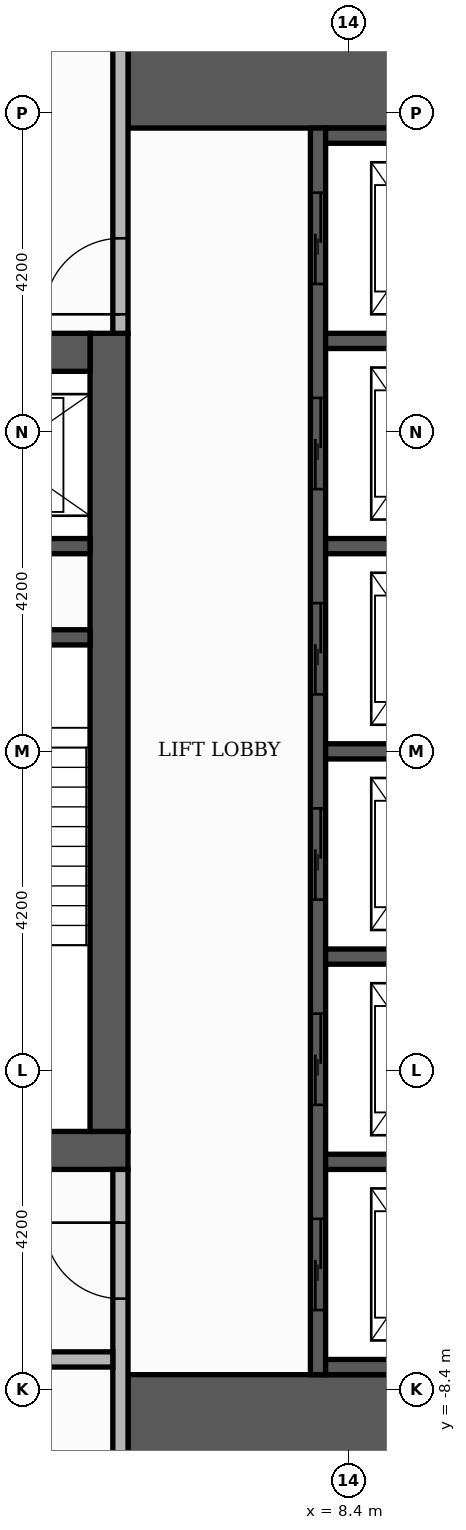
"""IFC4 building model, lengths in metres.
Left out: names, types, materials, properties, quantities, classifications, styles, units other than length and angle.
Written with IfcOpenShell. Run it as: python <this file> out.ifc"""

import sys

from ifc_helpers import new_model, si_unit, direction, frame, frame_2d, origin, place, context, subcontext, project, spatial, rectangle, extrude, element, fill, save


model = new_model("IFC4")
c1 = context("Model", 3, precision=1e-05, world=origin(), true_north=direction((0.0, 1.0)))
c2 = subcontext(c1, "Body", "Model", "MODEL_VIEW")
j1 = project(units=[si_unit("LENGTHUNIT", "METRE"), si_unit("PLANEANGLEUNIT", "RADIAN")], contexts=[c1])
p1 = place(None, origin())
s1 = spatial("IfcSite", under=j1, at=p1, CompositionType="ELEMENT")
p2 = place(p1, origin())
s2 = spatial("IfcBuilding", under=s1, at=p2, CompositionType="ELEMENT")
p3 = place(p2, frame((0.0, 0.0, 240.6)))
s3 = spatial("IfcBuildingStorey", under=s2, at=p3, CompositionType="ELEMENT", Elevation=240.6)
p4 = place(p3, frame((-5.5, -5.25, 0.0), z_axis=(0.0, 0.0, 1.0), x_axis=(1.0, 0.0, 0.0)))
e1 = element("IfcWall", 1, at=p4, inside=s3, PredefinedType="SHEAR", context=c2, shape_type="SweptSolid", body=[
    extrude(rectangle(XDim=11.0, YDim=0.5, at=frame_2d((5.5, 0.0))), origin(), (0.0, 0.0, 1.0), 3.48),
])
p5 = place(p4, frame((4.9, 0.0, 0.0)))
e2 = element("IfcOpeningElement", 2, at=p5, cuts=e1, PredefinedType="OPENING", context=c2, shape_type="SweptSolid", body=[
    extrude(rectangle(XDim=1.2, YDim=2.1, at=frame_2d((0.6, 1.05))), frame((0.0, 0.26, 0.0), z_axis=(0.0, -1.0, 0.0), x_axis=(1.0, 0.0, 0.0)), (0.0, 0.0, 1.0), 0.52),
])
p6 = place(p3, frame((5.25, -5.0, 0.0), z_axis=(0.0, 0.0, 1.0), x_axis=(0.0, 1.0, 0.0)))
e3 = element("IfcWall", 3, at=p6, inside=s3, PredefinedType="SHEAR", context=c2, shape_type="SweptSolid", body=[
    extrude(rectangle(XDim=10.5, YDim=0.5, at=frame_2d((5.25, 0.0))), origin(), (0.0, 0.0, 1.0), 3.48),
])
p7 = place(p3, frame((-5.0, 5.25, 0.0), z_axis=(0.0, 0.0, 1.0), x_axis=(1.0, 0.0, 0.0)))
e4 = element("IfcWall", 4, at=p7, inside=s3, PredefinedType="SHEAR", context=c2, shape_type="SweptSolid", body=[
    extrude(rectangle(XDim=10.0, YDim=0.5, at=frame_2d((5.0, 0.0))), origin(), (0.0, 0.0, 1.0), 3.48),
])
p8 = place(p7, frame((4.4, 0.0, 0.0)))
e5 = element("IfcOpeningElement", 5, at=p8, cuts=e4, PredefinedType="OPENING", context=c2, shape_type="SweptSolid", body=[
    extrude(rectangle(XDim=1.2, YDim=2.1, at=frame_2d((0.6, 1.05))), frame((0.0, 0.26, 0.0), z_axis=(0.0, -1.0, 0.0), x_axis=(1.0, 0.0, 0.0)), (0.0, 0.0, 1.0), 0.52),
])
for number, where, z_axis, x_axis in (
    (6, (5.5, -9.15, 0.0), (0.0, 0.0, 1.0), (1.0, 0.0, 0.0)),
    (7, (5.5, 9.15, 0.0), (0.0, 0.0, 1.0), (1.0, 0.0, 0.0)),
):
    element("IfcWall", number, at=place(p3, frame(where, z_axis=z_axis, x_axis=x_axis)), inside=s3, PredefinedType="SHEAR", context=c2, shape_type="SweptSolid", body=[
        extrude(rectangle(XDim=4.6, YDim=1.9, at=frame_2d((2.3, 0.0))), origin(), (0.0, 0.0, 1.0), 3.48),
    ])
p9 = place(p3, frame((2.15, 1.5, 0.0), z_axis=(0.0, 0.0, 1.0), x_axis=(1.0, 0.0, 0.0)))
e8 = element("IfcWall", 8, at=p9, inside=s3, PredefinedType="SHEAR", context=c2, shape_type="SweptSolid", body=[
    extrude(rectangle(XDim=2.85, YDim=0.2, at=frame_2d((1.425, 0.0))), origin(), (0.0, 0.0, 1.0), 3.48),
])
p10 = place(p3, frame((8.0, -8.2, 0.0), z_axis=(0.0, 0.0, 1.0), x_axis=(0.0, 1.0, 0.0)))
e9 = element("IfcWall", 9, at=p10, inside=s3, PredefinedType="SHEAR", context=c2, shape_type="SweptSolid", body=[
    extrude(rectangle(XDim=16.4, YDim=0.2, at=frame_2d((8.2, 0.0))), origin(), (0.0, 0.0, 1.0), 3.48),
])
p11 = place(p10, frame((0.85, 0.0, 0.0)))
e10 = element("IfcOpeningElement", 10, at=p11, cuts=e9, PredefinedType="OPENING", context=c2, shape_type="SweptSolid", body=[
    extrude(rectangle(XDim=1.2, YDim=2.1, at=frame_2d((0.6, 1.05))), frame((0.0, 0.11, 0.0), z_axis=(0.0, -1.0, 0.0), x_axis=(1.0, 0.0, 0.0)), (0.0, 0.0, 1.0), 0.22),
])
p12 = place(p10, frame((3.55, 0.0, 0.0)))
e11 = element("IfcOpeningElement", 11, at=p12, cuts=e9, PredefinedType="OPENING", context=c2, shape_type="SweptSolid", body=[
    extrude(rectangle(XDim=1.2, YDim=2.1, at=frame_2d((0.6, 1.05))), frame((0.0, 0.11, 0.0), z_axis=(0.0, -1.0, 0.0), x_axis=(1.0, 0.0, 0.0)), (0.0, 0.0, 1.0), 0.22),
])
p13 = place(p10, frame((6.25, 0.0, 0.0)))
e12 = element("IfcOpeningElement", 12, at=p13, cuts=e9, PredefinedType="OPENING", context=c2, shape_type="SweptSolid", body=[
    extrude(rectangle(XDim=1.2, YDim=2.1, at=frame_2d((0.6, 1.05))), frame((0.0, 0.11, 0.0), z_axis=(0.0, -1.0, 0.0), x_axis=(1.0, 0.0, 0.0)), (0.0, 0.0, 1.0), 0.22),
])
p14 = place(p10, frame((8.95, 0.0, 0.0)))
e13 = element("IfcOpeningElement", 13, at=p14, cuts=e9, PredefinedType="OPENING", context=c2, shape_type="SweptSolid", body=[
    extrude(rectangle(XDim=1.2, YDim=2.1, at=frame_2d((0.6, 1.05))), frame((0.0, 0.11, 0.0), z_axis=(0.0, -1.0, 0.0), x_axis=(1.0, 0.0, 0.0)), (0.0, 0.0, 1.0), 0.22),
])
p15 = place(p10, frame((11.65, 0.0, 0.0)))
e14 = element("IfcOpeningElement", 14, at=p15, cuts=e9, PredefinedType="OPENING", context=c2, shape_type="SweptSolid", body=[
    extrude(rectangle(XDim=1.2, YDim=2.1, at=frame_2d((0.6, 1.05))), frame((0.0, 0.11, 0.0), z_axis=(0.0, -1.0, 0.0), x_axis=(1.0, 0.0, 0.0)), (0.0, 0.0, 1.0), 0.22),
])
p16 = place(p10, frame((14.35, 0.0, 0.0)))
e15 = element("IfcOpeningElement", 15, at=p16, cuts=e9, PredefinedType="OPENING", context=c2, shape_type="SweptSolid", body=[
    extrude(rectangle(XDim=1.2, YDim=2.1, at=frame_2d((0.6, 1.05))), frame((0.0, 0.11, 0.0), z_axis=(0.0, -1.0, 0.0), x_axis=(1.0, 0.0, 0.0)), (0.0, 0.0, 1.0), 0.22),
])
for number, where, z_axis, x_axis in (
    (16, (8.1, -8.1, 0.0), (0.0, 0.0, 1.0), (1.0, 0.0, 0.0)),
    (17, (8.1, -5.4, 0.0), (0.0, 0.0, 1.0), (1.0, 0.0, 0.0)),
    (18, (8.1, -2.7, 0.0), (0.0, 0.0, 1.0), (1.0, 0.0, 0.0)),
    (19, (8.1, 0.0, 0.0), (0.0, 0.0, 1.0), (1.0, 0.0, 0.0)),
):
    element("IfcWall", number, at=place(p3, frame(where, z_axis=z_axis, x_axis=x_axis)), inside=s3, PredefinedType="SHEAR", context=c2, shape_type="SweptSolid", body=[
        extrude(rectangle(XDim=2.0, YDim=0.2, at=frame_2d((1.0, 0.0))), origin(), (0.0, 0.0, 1.0), 3.48),
    ])
p17 = place(p3, frame((2.15, 2.7, 0.0), z_axis=(0.0, 0.0, 1.0), x_axis=(1.0, 0.0, 0.0)))
e20 = element("IfcWall", 20, at=p17, inside=s3, PredefinedType="SHEAR", context=c2, shape_type="SweptSolid", body=[
    extrude(rectangle(XDim=2.85, YDim=0.2, at=frame_2d((1.425, 0.0))), origin(), (0.0, 0.0, 1.0), 3.48),
])
for number, where, z_axis, x_axis in (
    (21, (8.1, 2.7, 0.0), (0.0, 0.0, 1.0), (1.0, 0.0, 0.0)),
    (22, (8.1, 5.4, 0.0), (0.0, 0.0, 1.0), (1.0, 0.0, 0.0)),
    (23, (8.1, 8.1, 0.0), (0.0, 0.0, 1.0), (1.0, 0.0, 0.0)),
):
    element("IfcWall", number, at=place(p3, frame(where, z_axis=z_axis, x_axis=x_axis)), inside=s3, PredefinedType="SHEAR", context=c2, shape_type="SweptSolid", body=[
        extrude(rectangle(XDim=2.0, YDim=0.2, at=frame_2d((1.0, 0.0))), origin(), (0.0, 0.0, 1.0), 3.48),
    ])
p18 = place(p3, frame((5.4, -10.1, 0.0), z_axis=(0.0, 0.0, 1.0), x_axis=(0.0, 1.0, 0.0)))
e24 = element("IfcWall", 24, at=p18, inside=s3, PredefinedType="PARTITIONING", context=c2, shape_type="SweptSolid", body=[
    extrude(rectangle(XDim=4.6, YDim=0.2, at=frame_2d((2.3, 0.0))), origin(), (0.0, 0.0, 1.0), 3.48),
])
p19 = place(p18, frame((2.9, 0.0, 0.0)))
e25 = element("IfcOpeningElement", 25, at=p19, cuts=e24, PredefinedType="OPENING", context=c2, shape_type="SweptSolid", body=[
    extrude(rectangle(XDim=1.0, YDim=2.1, at=frame_2d((0.5, 1.05))), frame((0.0, 0.11, 0.0), z_axis=(0.0, -1.0, 0.0), x_axis=(1.0, 0.0, 0.0)), (0.0, 0.0, 1.0), 0.22),
])
p20 = place(p3, frame((2.35, -8.0, 0.0), z_axis=(0.0, 0.0, 1.0), x_axis=(1.0, 0.0, 0.0)))
e26 = element("IfcWall", 26, at=p20, inside=s3, PredefinedType="PARTITIONING", context=c2, shape_type="SweptSolid", body=[
    extrude(rectangle(XDim=2.95, YDim=0.2, at=frame_2d((1.475, 0.0))), origin(), (0.0, 0.0, 1.0), 3.48),
])
p21 = place(p20, frame((1.0, 0.0, 0.0)))
e27 = element("IfcOpeningElement", 27, at=p21, cuts=e26, PredefinedType="OPENING", context=c2, shape_type="SweptSolid", body=[
    extrude(rectangle(XDim=0.9, YDim=2.1, at=frame_2d((0.45, 1.05))), frame((0.0, 0.11, 0.0), z_axis=(0.0, -1.0, 0.0), x_axis=(1.0, 0.0, 0.0)), (0.0, 0.0, 1.0), 0.22),
])
p22 = place(p3, frame((5.4, 5.5, 0.0), z_axis=(0.0, 0.0, 1.0), x_axis=(0.0, 1.0, 0.0)))
e28 = element("IfcWall", 28, at=p22, inside=s3, PredefinedType="PARTITIONING", context=c2, shape_type="SweptSolid", body=[
    extrude(rectangle(XDim=4.6, YDim=0.2, at=frame_2d((2.3, 0.0))), origin(), (0.0, 0.0, 1.0), 3.48),
])
p23 = place(p22, frame((0.25, 0.0, 0.0)))
e29 = element("IfcOpeningElement", 29, at=p23, cuts=e28, PredefinedType="OPENING", context=c2, shape_type="SweptSolid", body=[
    extrude(rectangle(XDim=1.0, YDim=2.1, at=frame_2d((0.5, 1.05))), frame((0.0, 0.11, 0.0), z_axis=(0.0, -1.0, 0.0), x_axis=(1.0, 0.0, 0.0)), (0.0, 0.0, 1.0), 0.22),
])
p24 = place(p11, origin())
e30 = element("IfcDoor", 30, at=p24, inside=s3, OperationType="SLIDING_TO_LEFT", PredefinedType="DOOR", context=c2, shape_type="SweptSolid", body=[
    extrude(rectangle(XDim=1.2, YDim=2.1, at=frame_2d((0.6, 1.05))), frame((0.0, 0.025, 0.0), z_axis=(0.0, -1.0, 0.0), x_axis=(1.0, 0.0, 0.0)), (0.0, 0.0, 1.0), 0.05),
])
fill(e10, e30)
p25 = place(p12, origin())
e31 = element("IfcDoor", 31, at=p25, inside=s3, OperationType="SLIDING_TO_LEFT", PredefinedType="DOOR", context=c2, shape_type="SweptSolid", body=[
    extrude(rectangle(XDim=1.2, YDim=2.1, at=frame_2d((0.6, 1.05))), frame((0.0, 0.025, 0.0), z_axis=(0.0, -1.0, 0.0), x_axis=(1.0, 0.0, 0.0)), (0.0, 0.0, 1.0), 0.05),
])
fill(e11, e31)
p26 = place(p13, origin())
e32 = element("IfcDoor", 32, at=p26, inside=s3, OperationType="SLIDING_TO_LEFT", PredefinedType="DOOR", context=c2, shape_type="SweptSolid", body=[
    extrude(rectangle(XDim=1.2, YDim=2.1, at=frame_2d((0.6, 1.05))), frame((0.0, 0.025, 0.0), z_axis=(0.0, -1.0, 0.0), x_axis=(1.0, 0.0, 0.0)), (0.0, 0.0, 1.0), 0.05),
])
fill(e12, e32)
p27 = place(p14, origin())
e33 = element("IfcDoor", 33, at=p27, inside=s3, OperationType="SLIDING_TO_LEFT", PredefinedType="DOOR", context=c2, shape_type="SweptSolid", body=[
    extrude(rectangle(XDim=1.2, YDim=2.1, at=frame_2d((0.6, 1.05))), frame((0.0, 0.025, 0.0), z_axis=(0.0, -1.0, 0.0), x_axis=(1.0, 0.0, 0.0)), (0.0, 0.0, 1.0), 0.05),
])
fill(e13, e33)
p28 = place(p15, origin())
e34 = element("IfcDoor", 34, at=p28, inside=s3, OperationType="SLIDING_TO_LEFT", PredefinedType="DOOR", context=c2, shape_type="SweptSolid", body=[
    extrude(rectangle(XDim=1.2, YDim=2.1, at=frame_2d((0.6, 1.05))), frame((0.0, 0.025, 0.0), z_axis=(0.0, -1.0, 0.0), x_axis=(1.0, 0.0, 0.0)), (0.0, 0.0, 1.0), 0.05),
])
fill(e14, e34)
p29 = place(p16, origin())
e35 = element("IfcDoor", 35, at=p29, inside=s3, OperationType="SLIDING_TO_LEFT", PredefinedType="DOOR", context=c2, shape_type="SweptSolid", body=[
    extrude(rectangle(XDim=1.2, YDim=2.1, at=frame_2d((0.6, 1.05))), frame((0.0, 0.025, 0.0), z_axis=(0.0, -1.0, 0.0), x_axis=(1.0, 0.0, 0.0)), (0.0, 0.0, 1.0), 0.05),
])
fill(e15, e35)
p30 = place(p23, origin())
e36 = element("IfcDoor", 36, at=p30, inside=s3, OperationType="SINGLE_SWING_LEFT", PredefinedType="DOOR", context=c2, shape_type="SweptSolid", body=[
    extrude(rectangle(XDim=1.0, YDim=2.1, at=frame_2d((0.5, 1.05))), frame((0.0, 0.025, 0.0), z_axis=(0.0, -1.0, 0.0), x_axis=(1.0, 0.0, 0.0)), (0.0, 0.0, 1.0), 0.05),
])
fill(e29, e36)
p31 = place(p19, origin())
e37 = element("IfcDoor", 37, at=p31, inside=s3, OperationType="SINGLE_SWING_RIGHT", PredefinedType="DOOR", context=c2, shape_type="SweptSolid", body=[
    extrude(rectangle(XDim=1.0, YDim=2.1, at=frame_2d((0.5, 1.05))), frame((0.0, 0.025, 0.0), z_axis=(0.0, -1.0, 0.0), x_axis=(1.0, 0.0, 0.0)), (0.0, 0.0, 1.0), 0.05),
])
fill(e25, e37)
save(model, sys.argv[1])
